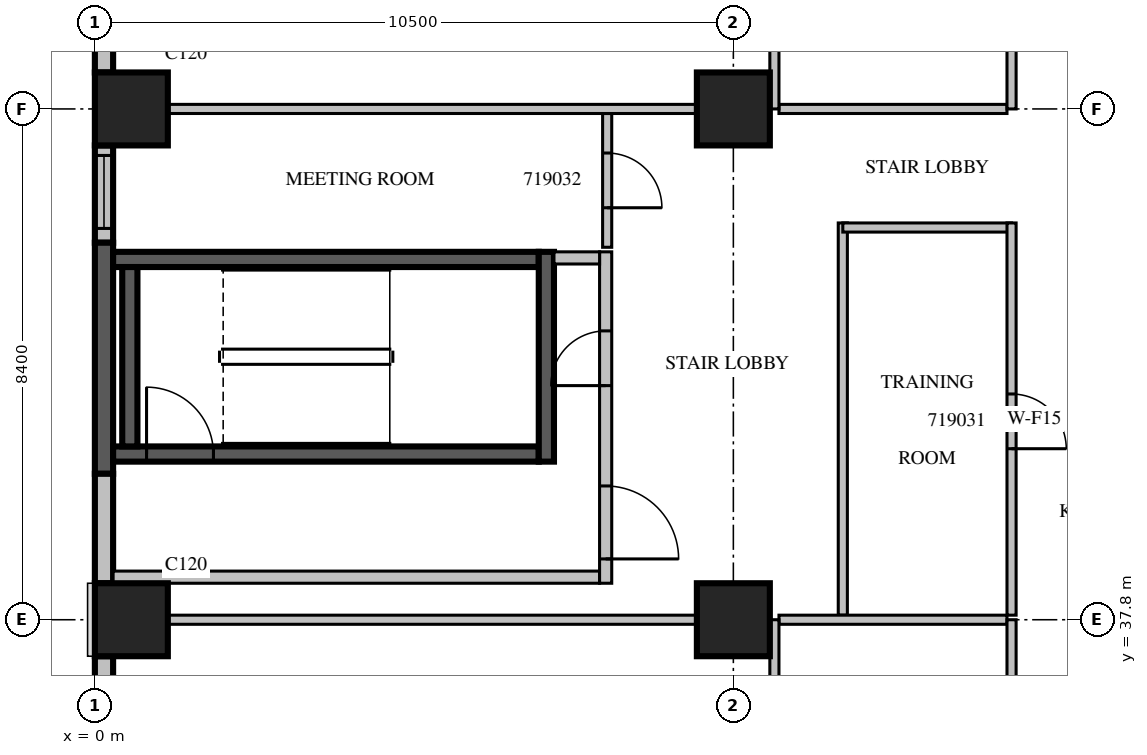
"""IFC4 building model, lengths in metres.
Left out: names, types, materials, properties, quantities, classifications, styles, units other than length and angle.
Written with IfcOpenShell. Run it as: python <this file> out.ifc"""

import sys

from ifc_helpers import new_model, si_unit, direction, frame, frame_2d, origin, origin_2d, place, context, subcontext, project, spatial, rectangle, extrude, source, transform, mapped, element, fill, save


model = new_model("IFC4")
c1 = context("Model", 3, precision=1e-05, world=origin(), true_north=direction((0.0, 1.0)))
c2 = subcontext(c1, "Body", "Model", "MODEL_VIEW")
j1 = project(units=[si_unit("LENGTHUNIT", "METRE"), si_unit("PLANEANGLEUNIT", "RADIAN")], contexts=[c1])
p1 = place(None, origin())
s1 = spatial("IfcSite", under=j1, at=p1, CompositionType="ELEMENT")
p2 = place(p1, origin())
s2 = spatial("IfcBuilding", under=s1, at=p2, CompositionType="ELEMENT")
p3 = place(p2, frame((0.0, 0.0, 90.9)))
s3 = spatial("IfcBuildingStorey", under=s2, at=p3, CompositionType="ELEMENT", Elevation=90.9)
m1 = source(origin(), c2, "Body", "SweptSolid", [
    extrude(rectangle(XDim=1.2, YDim=1.2, at=origin_2d()), origin(), (0.0, 0.0, 1.0), 4.2),
])
for number, where, z_axis, x_axis in (
    (1, (0.6, 37.8, 0.0), (0.0, 0.0, 1.0), (1.0, 0.0, 0.0)),
    (2, (10.5, 37.8, 0.0), (0.0, 0.0, 1.0), (1.0, 0.0, 0.0)),
    (3, (0.6, 46.2, 0.0), (0.0, 0.0, 1.0), (1.0, 0.0, 0.0)),
    (4, (10.5, 46.2, 0.0), (0.0, 0.0, 1.0), (1.0, 0.0, 0.0)),
):
    element("IfcColumn", number, at=place(p3, frame(where, z_axis=z_axis, x_axis=x_axis)), inside=s3, PredefinedType="COLUMN", context=c2, shape_type="MappedRepresentation", body=[
        mapped(m1, transform((0.0, 0.0, 0.0), scale=1.0)),
    ])
m2 = source(origin(), c2, "Body", "SweptSolid", [
    extrude(rectangle(XDim=4.68, YDim=0.3, at=frame_2d((2.34, 0.0))), origin(), (0.0, 0.0, 1.0), 3.8),
])
p4 = place(p3, frame((0.15, 51.48, 0.0), z_axis=(0.0, 0.0, 1.0), x_axis=(0.0, -1.0, 0.0)))
e5 = element("IfcWall", 5, at=p4, inside=s3, PredefinedType="STANDARD", context=c2, shape_type="MappedRepresentation", body=[
    mapped(m2, transform((0.0, 0.0, 0.0), scale=1.0)),
])
m3 = source(origin(), c2, "Body", "SweptSolid", [
    extrude(rectangle(XDim=1.8, YDim=2.7, at=frame_2d((0.9, 1.35))), frame((0.0, 0.16, 0.0), z_axis=(0.0, -1.0, 0.0), x_axis=(1.0, 0.0, 0.0)), (0.0, 0.0, 1.0), 0.32),
])
p5 = place(p4, frame((1.545, 0.0, 0.6)))
e6 = element("IfcOpeningElement", 6, at=p5, cuts=e5, PredefinedType="OPENING", context=c2, shape_type="MappedRepresentation", body=[
    mapped(m3, transform((0.0, 0.0, 0.0), scale=1.0)),
])
m4 = source(origin(), c2, "Body", "SweptSolid", [
    extrude(rectangle(XDim=1.6, YDim=0.3, at=frame_2d((0.8, 0.0))), origin(), (0.0, 0.0, 1.0), 3.8),
])
p6 = place(p3, frame((0.15, 45.6, 0.0), z_axis=(0.0, 0.0, 1.0), x_axis=(0.0, -1.0, 0.0)))
e7 = element("IfcWall", 7, at=p6, inside=s3, PredefinedType="STANDARD", context=c2, shape_type="MappedRepresentation", body=[
    mapped(m4, transform((0.0, 0.0, 0.0), scale=1.0)),
])
m5 = source(origin(), c2, "Body", "SweptSolid", [
    extrude(rectangle(XDim=1.2, YDim=2.7, at=frame_2d((0.6, 1.35))), frame((0.0, 0.16, 0.0), z_axis=(0.0, -1.0, 0.0), x_axis=(1.0, 0.0, 0.0)), (0.0, 0.0, 1.0), 0.32),
])
p7 = place(p6, frame((0.165, 0.0, 0.6)))
e8 = element("IfcOpeningElement", 8, at=p7, cuts=e7, PredefinedType="OPENING", context=c2, shape_type="MappedRepresentation", body=[
    mapped(m5, transform((0.0, 0.0, 0.0), scale=1.0)),
])
m6 = source(origin(), c2, "Body", "SweptSolid", [
    extrude(rectangle(XDim=3.8, YDim=0.3, at=frame_2d((1.9, 0.0))), origin(), (0.0, 0.0, 1.0), 3.8),
])
p8 = place(p3, frame((0.15, 44.0, 0.0), z_axis=(0.0, 0.0, 1.0), x_axis=(0.0, -1.0, 0.0)))
e9 = element("IfcWall", 9, at=p8, inside=s3, PredefinedType="SOLIDWALL", context=c2, shape_type="MappedRepresentation", body=[
    mapped(m6, transform((0.0, 0.0, 0.0), scale=1.0)),
])
m7 = source(origin(), c2, "Body", "SweptSolid", [
    extrude(rectangle(XDim=1.8, YDim=0.3, at=frame_2d((0.9, 0.0))), origin(), (0.0, 0.0, 1.0), 3.8),
])
p9 = place(p3, frame((0.15, 40.2, 0.0), z_axis=(0.0, 0.0, 1.0), x_axis=(0.0, -1.0, 0.0)))
e10 = element("IfcWall", 10, at=p9, inside=s3, PredefinedType="STANDARD", context=c2, shape_type="MappedRepresentation", body=[
    mapped(m7, transform((0.0, 0.0, 0.0), scale=1.0)),
])
m8 = source(origin(), c2, "Body", "SweptSolid", [
    extrude(rectangle(XDim=7.2, YDim=0.3, at=frame_2d((3.6, 0.0))), origin(), (0.0, 0.0, 1.0), 3.8),
])
p10 = place(p3, frame((0.15, 37.2, 0.0), z_axis=(0.0, 0.0, 1.0), x_axis=(0.0, -1.0, 0.0)))
e11 = element("IfcWall", 11, at=p10, inside=s3, PredefinedType="STANDARD", context=c2, shape_type="MappedRepresentation", body=[
    mapped(m8, transform((0.0, 0.0, 0.0), scale=1.0)),
])
p11 = place(p10, frame((1.008, 0.0, 0.6)))
e12 = element("IfcOpeningElement", 12, at=p11, cuts=e11, PredefinedType="OPENING", context=c2, shape_type="MappedRepresentation", body=[
    mapped(m3, transform((0.0, 0.0, 0.0), scale=1.0)),
])
p12 = place(p10, frame((4.104, 0.0, 0.6)))
e13 = element("IfcOpeningElement", 13, at=p12, cuts=e11, PredefinedType="OPENING", context=c2, shape_type="MappedRepresentation", body=[
    mapped(m3, transform((0.0, 0.0, 0.0), scale=1.0)),
])
m9 = source(origin(), c2, "Body", "SweptSolid", [
    extrude(rectangle(XDim=7.0, YDim=0.25, at=frame_2d((3.5, 0.0))), origin(), (0.0, 0.0, 1.0), 3.8),
])
p13 = place(p3, frame((0.3, 40.525, 0.0), z_axis=(0.0, 0.0, 1.0), x_axis=(1.0, 0.0, 0.0)))
e14 = element("IfcWall", 14, at=p13, inside=s3, PredefinedType="SOLIDWALL", context=c2, shape_type="MappedRepresentation", body=[
    mapped(m9, transform((0.0, 0.0, 0.0), scale=1.0)),
])
m10 = source(origin(), c2, "Body", "SweptSolid", [
    extrude(rectangle(XDim=1.1, YDim=2.1, at=frame_2d((0.55, 1.05))), frame((0.0, 0.135, 0.0), z_axis=(0.0, -1.0, 0.0), x_axis=(1.0, 0.0, 0.0)), (0.0, 0.0, 1.0), 0.27),
])
p14 = place(p13, frame((0.55, 0.0, 0.0)))
e15 = element("IfcOpeningElement", 15, at=p14, cuts=e14, PredefinedType="OPENING", context=c2, shape_type="MappedRepresentation", body=[
    mapped(m10, transform((0.0, 0.0, 0.0), scale=1.0)),
])
p15 = place(p3, frame((0.3, 43.725, 0.0), z_axis=(0.0, 0.0, 1.0), x_axis=(1.0, 0.0, 0.0)))
e16 = element("IfcWall", 16, at=p15, inside=s3, PredefinedType="SOLIDWALL", context=c2, shape_type="MappedRepresentation", body=[
    mapped(m9, transform((0.0, 0.0, 0.0), scale=1.0)),
])
m11 = source(origin(), c2, "Body", "SweptSolid", [
    extrude(rectangle(XDim=3.45, YDim=0.25, at=frame_2d((1.725, 0.0))), origin(), (0.0, 0.0, 1.0), 3.8),
])
p16 = place(p3, frame((7.425, 40.4, 0.0), z_axis=(0.0, 0.0, 1.0), x_axis=(0.0, 1.0, 0.0)))
e17 = element("IfcWall", 17, at=p16, inside=s3, PredefinedType="SOLIDWALL", context=c2, shape_type="MappedRepresentation", body=[
    mapped(m11, transform((0.0, 0.0, 0.0), scale=1.0)),
])
m12 = source(origin(), c2, "Body", "SweptSolid", [
    extrude(rectangle(XDim=2.95, YDim=0.25, at=frame_2d((1.475, 0.0))), origin(), (0.0, 0.0, 1.0), 3.8),
])
p17 = place(p3, frame((0.575, 40.65, 0.0), z_axis=(0.0, 0.0, 1.0), x_axis=(0.0, 1.0, 0.0)))
e18 = element("IfcWall", 18, at=p17, inside=s3, PredefinedType="SOLIDWALL", context=c2, shape_type="MappedRepresentation", body=[
    mapped(m12, transform((0.0, 0.0, 0.0), scale=1.0)),
])
m13 = source(origin(), c2, "Body", "SweptSolid", [
    extrude(rectangle(XDim=8.0, YDim=0.2, at=frame_2d((4.0, 0.0))), origin(), (0.0, 0.0, 1.0), 3.8),
])
p18 = place(p3, frame((0.3, 38.5, 0.0), z_axis=(0.0, 0.0, 1.0), x_axis=(1.0, 0.0, 0.0)))
e19 = element("IfcWall", 19, at=p18, inside=s3, PredefinedType="PARTITIONING", context=c2, shape_type="MappedRepresentation", body=[
    mapped(m13, transform((0.0, 0.0, 0.0), scale=1.0)),
])
m14 = source(origin(), c2, "Body", "SweptSolid", [
    extrude(rectangle(XDim=5.45, YDim=0.2, at=frame_2d((2.725, 0.0))), origin(), (0.0, 0.0, 1.0), 3.8),
])
p19 = place(p3, frame((8.4, 38.4, 0.0), z_axis=(0.0, 0.0, 1.0), x_axis=(0.0, 1.0, 0.0)))
e20 = element("IfcWall", 20, at=p19, inside=s3, PredefinedType="PARTITIONING", context=c2, shape_type="MappedRepresentation", body=[
    mapped(m14, transform((0.0, 0.0, 0.0), scale=1.0)),
])
m15 = source(origin(), c2, "Body", "SweptSolid", [
    extrude(rectangle(XDim=1.2, YDim=2.1, at=frame_2d((0.6, 1.05))), frame((0.0, 0.11, 0.0), z_axis=(0.0, -1.0, 0.0), x_axis=(1.0, 0.0, 0.0)), (0.0, 0.0, 1.0), 0.22),
])
p20 = place(p19, frame((0.4, 0.0, 0.0)))
e21 = element("IfcOpeningElement", 21, at=p20, cuts=e20, PredefinedType="OPENING", context=c2, shape_type="MappedRepresentation", body=[
    mapped(m15, transform((0.0, 0.0, 0.0), scale=1.0)),
])
m16 = source(origin(), c2, "Body", "SweptSolid", [
    extrude(rectangle(XDim=0.9, YDim=2.1, at=frame_2d((0.45, 1.05))), frame((0.0, 0.11, 0.0), z_axis=(0.0, -1.0, 0.0), x_axis=(1.0, 0.0, 0.0)), (0.0, 0.0, 1.0), 0.22),
])
p21 = place(p19, frame((3.25, 0.0, 0.0)))
e22 = element("IfcOpeningElement", 22, at=p21, cuts=e20, PredefinedType="OPENING", context=c2, shape_type="MappedRepresentation", body=[
    mapped(m16, transform((0.0, 0.0, 0.0), scale=1.0)),
])
m17 = source(origin(), c2, "Body", "SweptSolid", [
    extrude(rectangle(XDim=0.75, YDim=0.2, at=frame_2d((0.375, 0.0))), origin(), (0.0, 0.0, 1.0), 3.8),
])
p22 = place(p3, frame((7.55, 43.75, 0.0), z_axis=(0.0, 0.0, 1.0), x_axis=(1.0, 0.0, 0.0)))
e23 = element("IfcWall", 23, at=p22, inside=s3, PredefinedType="PARTITIONING", context=c2, shape_type="MappedRepresentation", body=[
    mapped(m17, transform((0.0, 0.0, 0.0), scale=1.0)),
])
m18 = source(origin(), c2, "Body", "SweptSolid", [
    extrude(rectangle(XDim=6.45, YDim=0.15, at=frame_2d((3.225, 0.0))), origin(), (0.0, 0.0, 1.0), 3.8),
])
p23 = place(p3, frame((12.3, 44.325, 0.0), z_axis=(0.0, 0.0, 1.0), x_axis=(0.0, -1.0, 0.0)))
e24 = element("IfcWall", 24, at=p23, inside=s3, PredefinedType="PARTITIONING", context=c2, shape_type="MappedRepresentation", body=[
    mapped(m18, transform((0.0, 0.0, 0.0), scale=1.0)),
])
m19 = source(origin(), c2, "Body", "SweptSolid", [
    extrude(rectangle(XDim=2.775, YDim=0.15, at=frame_2d((1.387, 0.0))), origin(), (0.0, 0.0, 1.0), 3.8),
])
p24 = place(p3, frame((15.075, 44.25, 0.0), z_axis=(0.0, 0.0, 1.0), x_axis=(-1.0, 0.0, 0.0)))
e25 = element("IfcWall", 25, at=p24, inside=s3, PredefinedType="PARTITIONING", context=c2, shape_type="MappedRepresentation", body=[
    mapped(m19, transform((0.0, 0.0, 0.0), scale=1.0)),
])
p25 = place(p3, frame((15.075, 37.875, 0.0), z_axis=(0.0, 0.0, 1.0), x_axis=(0.0, 1.0, 0.0)))
e26 = element("IfcWall", 26, at=p25, inside=s3, PredefinedType="PARTITIONING", context=c2, shape_type="MappedRepresentation", body=[
    mapped(m18, transform((0.0, 0.0, 0.0), scale=1.0)),
])
m20 = source(origin(), c2, "Body", "SweptSolid", [
    extrude(rectangle(XDim=0.9, YDim=2.1, at=frame_2d((0.45, 1.05))), frame((0.0, 0.085, 0.0), z_axis=(0.0, -1.0, 0.0), x_axis=(1.0, 0.0, 0.0)), (0.0, 0.0, 1.0), 0.17),
])
p26 = place(p25, frame((2.737, 0.0, 0.0)))
e27 = element("IfcOpeningElement", 27, at=p26, cuts=e26, PredefinedType="OPENING", context=c2, shape_type="MappedRepresentation", body=[
    mapped(m20, transform((0.0, 0.0, 0.0), scale=1.0)),
])
m21 = source(origin(), c2, "Body", "SweptSolid", [
    extrude(rectangle(XDim=2.2, YDim=0.15, at=frame_2d((1.1, 0.0))), origin(), (0.0, 0.0, 1.0), 3.8),
])
p27 = place(p3, frame((8.425, 43.925, 0.0), z_axis=(0.0, 0.0, 1.0), x_axis=(0.0, 1.0, 0.0)))
e28 = element("IfcWall", 28, at=p27, inside=s3, PredefinedType="PARTITIONING", context=c2, shape_type="MappedRepresentation", body=[
    mapped(m21, transform((0.0, 0.0, 0.0), scale=1.0)),
])
p28 = place(p27, frame((0.65, 0.0, 0.0)))
e29 = element("IfcOpeningElement", 29, at=p28, cuts=e28, PredefinedType="OPENING", context=c2, shape_type="MappedRepresentation", body=[
    mapped(m20, transform((0.0, 0.0, 0.0), scale=1.0)),
])
m22 = source(origin(), c2, "Body", "SweptSolid", [
    extrude(rectangle(XDim=8.702, YDim=0.15, at=frame_2d((4.351, 0.0))), origin(), (0.0, 0.0, 1.0), 3.8),
])
p29 = place(p3, frame((9.901, 37.8, 0.0), z_axis=(0.0, 0.0, 1.0), x_axis=(-1.0, 0.0, 0.0)))
e30 = element("IfcWall", 30, at=p29, inside=s3, PredefinedType="PARTITIONING", context=c2, shape_type="MappedRepresentation", body=[
    mapped(m22, transform((0.0, 0.0, 0.0), scale=1.0)),
])
m23 = source(origin(), c2, "Body", "SweptSolid", [
    extrude(rectangle(XDim=3.75, YDim=0.15, at=frame_2d((1.875, 0.0))), origin(), (0.0, 0.0, 1.0), 3.8),
])
p30 = place(p3, frame((15.0, 37.8, 0.0), z_axis=(0.0, 0.0, 1.0), x_axis=(-1.0, 0.0, 0.0)))
e31 = element("IfcWall", 31, at=p30, inside=s3, PredefinedType="PARTITIONING", context=c2, shape_type="MappedRepresentation", body=[
    mapped(m23, transform((0.0, 0.0, 0.0), scale=1.0)),
])
m24 = source(origin(), c2, "Body", "SweptSolid", [
    extrude(rectangle(XDim=8.4, YDim=0.15, at=frame_2d((4.2, 0.0))), origin(), (0.0, 0.0, 1.0), 3.8),
])
p31 = place(p3, frame((11.175, 29.4, 0.0), z_axis=(0.0, 0.0, 1.0), x_axis=(0.0, 1.0, 0.0)))
e32 = element("IfcWall", 32, at=p31, inside=s3, PredefinedType="PARTITIONING", context=c2, shape_type="MappedRepresentation", body=[
    mapped(m24, transform((0.0, 0.0, 0.0), scale=1.0)),
])
p32 = place(p31, frame((1.962, 0.0, 0.0)))
e33 = element("IfcOpeningElement", 33, at=p32, cuts=e32, PredefinedType="OPENING", context=c2, shape_type="MappedRepresentation", body=[
    mapped(m20, transform((0.0, 0.0, 0.0), scale=1.0)),
])
p33 = place(p31, frame((5.588, 0.0, 0.0)))
e34 = element("IfcOpeningElement", 34, at=p33, cuts=e32, PredefinedType="OPENING", context=c2, shape_type="MappedRepresentation", body=[
    mapped(m20, transform((0.0, 0.0, 0.0), scale=1.0)),
])
p34 = place(p3, frame((9.901, 46.2, 0.0), z_axis=(0.0, 0.0, 1.0), x_axis=(-1.0, 0.0, 0.0)))
e35 = element("IfcWall", 35, at=p34, inside=s3, PredefinedType="PARTITIONING", context=c2, shape_type="MappedRepresentation", body=[
    mapped(m22, transform((0.0, 0.0, 0.0), scale=1.0)),
])
p35 = place(p3, frame((15.0, 46.2, 0.0), z_axis=(0.0, 0.0, 1.0), x_axis=(-1.0, 0.0, 0.0)))
e36 = element("IfcWall", 36, at=p35, inside=s3, PredefinedType="PARTITIONING", context=c2, shape_type="MappedRepresentation", body=[
    mapped(m23, transform((0.0, 0.0, 0.0), scale=1.0)),
])
m25 = source(origin(), c2, "Body", "SweptSolid", [
    extrude(rectangle(XDim=13.14, YDim=0.15, at=frame_2d((6.57, 0.0))), origin(), (0.0, 0.0, 1.0), 3.8),
])
p36 = place(p3, frame((11.175, 46.2, 0.0), z_axis=(0.0, 0.0, 1.0), x_axis=(0.0, 1.0, 0.0)))
e37 = element("IfcWall", 37, at=p36, inside=s3, PredefinedType="PARTITIONING", context=c2, shape_type="MappedRepresentation", body=[
    mapped(m25, transform((0.0, 0.0, 0.0), scale=1.0)),
])
m26 = source(origin(), c2, "Body", "SweptSolid", [
    extrude(rectangle(XDim=1.1, YDim=2.1, at=frame_2d((0.55, 1.05))), frame((0.0, 0.085, 0.0), z_axis=(0.0, -1.0, 0.0), x_axis=(1.0, 0.0, 0.0)), (0.0, 0.0, 1.0), 0.17),
])
p37 = place(p36, frame((2.388, 0.0, 0.0)))
e38 = element("IfcOpeningElement", 38, at=p37, cuts=e37, PredefinedType="OPENING", context=c2, shape_type="MappedRepresentation", body=[
    mapped(m26, transform((0.0, 0.0, 0.0), scale=1.0)),
])
p38 = place(p3, frame((15.075, 29.4, 0.0), z_axis=(0.0, 0.0, 1.0), x_axis=(0.0, 1.0, 0.0)))
e39 = element("IfcWall", 39, at=p38, inside=s3, PredefinedType="PARTITIONING", context=c2, shape_type="MappedRepresentation", body=[
    mapped(m24, transform((0.0, 0.0, 0.0), scale=1.0)),
])
m27 = source(origin(), c2, "Body", "SweptSolid", [
    extrude(rectangle(XDim=1.2, YDim=2.1, at=frame_2d((0.6, 1.05))), frame((0.0, 0.085, 0.0), z_axis=(0.0, -1.0, 0.0), x_axis=(1.0, 0.0, 0.0)), (0.0, 0.0, 1.0), 0.17),
])
p39 = place(p38, frame((3.6, 0.0, 0.0)))
e40 = element("IfcOpeningElement", 40, at=p39, cuts=e39, PredefinedType="OPENING", context=c2, shape_type="MappedRepresentation", body=[
    mapped(m27, transform((0.0, 0.0, 0.0), scale=1.0)),
])
p40 = place(p3, frame((15.075, 46.2, 0.0), z_axis=(0.0, 0.0, 1.0), x_axis=(0.0, 1.0, 0.0)))
e41 = element("IfcWall", 41, at=p40, inside=s3, PredefinedType="PARTITIONING", context=c2, shape_type="MappedRepresentation", body=[
    mapped(m25, transform((0.0, 0.0, 0.0), scale=1.0)),
])
p41 = place(p40, frame((2.39, 0.0, 0.0)))
e42 = element("IfcOpeningElement", 42, at=p41, cuts=e41, PredefinedType="OPENING", context=c2, shape_type="MappedRepresentation", body=[
    mapped(m26, transform((0.0, 0.0, 0.0), scale=1.0)),
])
p42 = place(p40, frame((6.928, 0.0, 0.0)))
e43 = element("IfcOpeningElement", 43, at=p42, cuts=e41, PredefinedType="OPENING", context=c2, shape_type="MappedRepresentation", body=[
    mapped(m20, transform((0.0, 0.0, 0.0), scale=1.0)),
])
p43 = place(p40, frame((10.596, 0.0, 0.0)))
e44 = element("IfcOpeningElement", 44, at=p43, cuts=e41, PredefinedType="OPENING", context=c2, shape_type="MappedRepresentation", body=[
    mapped(m20, transform((0.0, 0.0, 0.0), scale=1.0)),
])
m28 = source(origin(), c2, "Body", "SweptSolid", [
    extrude(rectangle(XDim=1.2, YDim=2.7, at=frame_2d((0.6, 1.35))), frame((0.0, 0.03, 0.0), z_axis=(0.0, -1.0, 0.0), x_axis=(1.0, 0.0, 0.0)), (0.0, 0.0, 1.0), 0.06),
])
p44 = place(p7, origin())
e45 = element("IfcWindow", 45, at=p44, inside=s3, PartitioningType="SINGLE_PANEL", PredefinedType="WINDOW", context=c2, shape_type="MappedRepresentation", body=[
    mapped(m28, transform((0.0, 0.0, 0.0), scale=1.0)),
])
fill(e8, e45)
m29 = source(origin(), c2, "Body", "SweptSolid", [
    extrude(rectangle(XDim=1.1, YDim=2.1, at=frame_2d((0.55, 1.05))), frame((0.0, 0.025, 0.0), z_axis=(0.0, -1.0, 0.0), x_axis=(1.0, 0.0, 0.0)), (0.0, 0.0, 1.0), 0.05),
])
p45 = place(p14, origin())
e46 = element("IfcDoor", 46, at=p45, inside=s3, OperationType="SINGLE_SWING_LEFT", PredefinedType="DOOR", context=c2, shape_type="MappedRepresentation", body=[
    mapped(m29, transform((0.0, 0.0, 0.0), scale=1.0)),
])
fill(e15, e46)
m30 = source(origin(), c2, "Body", "SweptSolid", [
    extrude(rectangle(XDim=1.2, YDim=2.1, at=frame_2d((0.6, 1.05))), frame((0.0, 0.025, 0.0), z_axis=(0.0, -1.0, 0.0), x_axis=(1.0, 0.0, 0.0)), (0.0, 0.0, 1.0), 0.05),
])
p46 = place(p20, origin())
e47 = element("IfcDoor", 47, at=p46, inside=s3, OperationType="SINGLE_SWING_RIGHT", PredefinedType="DOOR", context=c2, shape_type="MappedRepresentation", body=[
    mapped(m30, transform((0.0, 0.0, 0.0), scale=1.0)),
])
fill(e21, e47)
m31 = source(origin(), c2, "Body", "SweptSolid", [
    extrude(rectangle(XDim=0.9, YDim=2.1, at=frame_2d((0.45, 1.05))), frame((0.0, 0.025, 0.0), z_axis=(0.0, -1.0, 0.0), x_axis=(1.0, 0.0, 0.0)), (0.0, 0.0, 1.0), 0.05),
])
p47 = place(p21, origin())
e48 = element("IfcDoor", 48, at=p47, inside=s3, OperationType="SINGLE_SWING_LEFT", PredefinedType="DOOR", context=c2, shape_type="MappedRepresentation", body=[
    mapped(m31, transform((0.0, 0.0, 0.0), scale=1.0)),
])
fill(e22, e48)
p48 = place(p26, origin())
e49 = element("IfcDoor", 49, at=p48, inside=s3, OperationType="SINGLE_SWING_RIGHT", PredefinedType="DOOR", context=c2, shape_type="MappedRepresentation", body=[
    mapped(m31, transform((0.0, 0.0, 0.0), scale=1.0)),
])
fill(e27, e49)
p49 = place(p28, origin())
e50 = element("IfcDoor", 50, at=p49, inside=s3, OperationType="SINGLE_SWING_RIGHT", PredefinedType="DOOR", context=c2, shape_type="MappedRepresentation", body=[
    mapped(m31, transform((0.0, 0.0, 0.0), scale=1.0)),
])
fill(e29, e50)
save(model, sys.argv[1])
